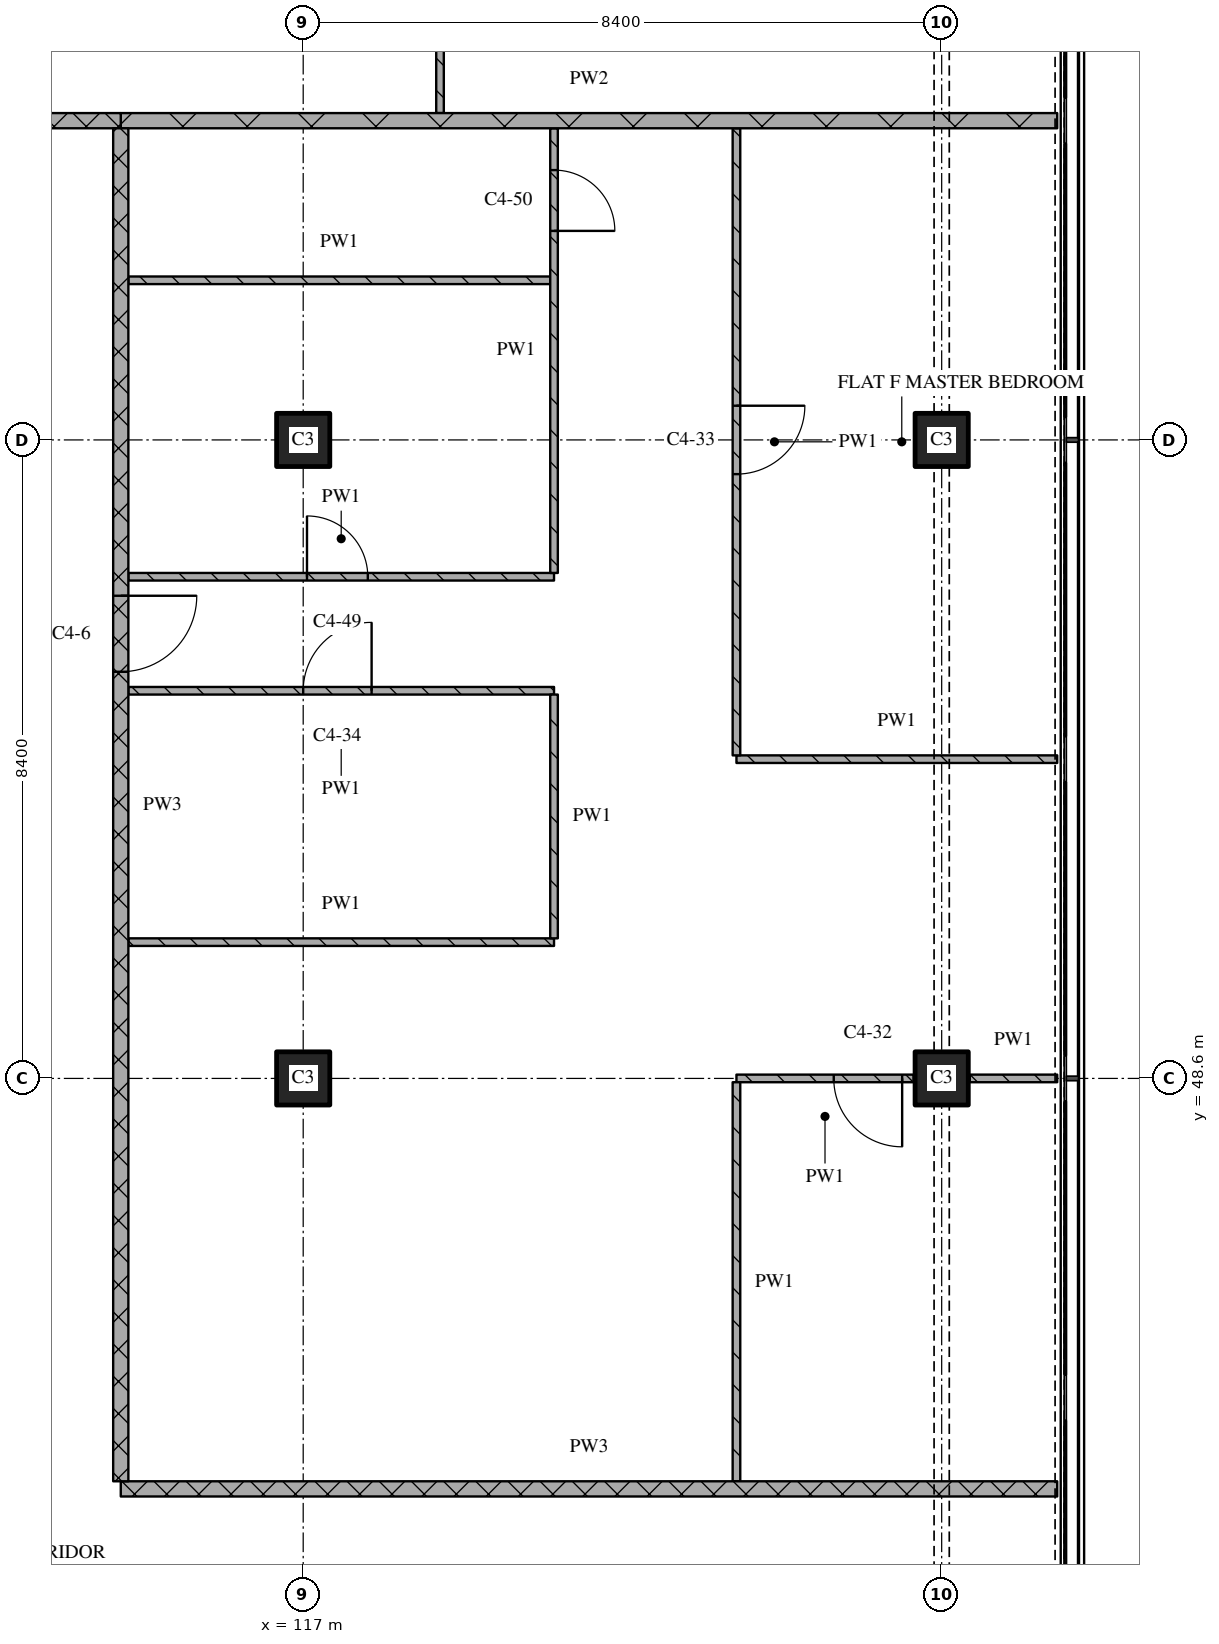
"""IFC4 building model, lengths in metres.
Left out: names, types, materials, properties, quantities, classifications, styles, units other than length and angle.
Written with IfcOpenShell. Run it as: python <this file> out.ifc"""

import sys

from ifc_helpers import new_model, si_unit, direction, frame, frame_2d, origin, origin_2d, place, context, subcontext, project, spatial, rectangle, extrude, element, fill, save


model = new_model("IFC4")
c1 = context("Model", 3, precision=1e-05, world=origin(), true_north=direction((0.0, 1.0)))
c2 = subcontext(c1, "Body", "Model", "MODEL_VIEW")
j1 = project(units=[si_unit("LENGTHUNIT", "METRE"), si_unit("PLANEANGLEUNIT", "RADIAN")], contexts=[c1])
p1 = place(None, origin())
s1 = spatial("IfcSite", under=j1, at=p1, CompositionType="ELEMENT")
p2 = place(p1, origin())
s2 = spatial("IfcBuilding", under=s1, at=p2, CompositionType="ELEMENT")
p3 = place(p2, frame((0.0, 0.0, 187.05)))
s3 = spatial("IfcBuildingStorey", under=s2, at=p3, CompositionType="ELEMENT", Elevation=187.05)
for number, where, z_axis, x_axis in (
    (1, (117.0, 48.6, 0.0), (0.0, 0.0, 1.0), (1.0, 0.0, 0.0)),
    (2, (117.0, 57.0, 0.0), (0.0, 0.0, 1.0), (1.0, 0.0, 0.0)),
    (3, (125.4, 48.6, 0.0), (0.0, 0.0, 1.0), (1.0, 0.0, 0.0)),
    (4, (125.4, 57.0, 0.0), (0.0, 0.0, 1.0), (1.0, 0.0, 0.0)),
):
    element("IfcColumn", number, at=place(p3, frame(where, z_axis=z_axis, x_axis=x_axis)), inside=s3, PredefinedType="COLUMN", context=c2, shape_type="SweptSolid", body=[
        extrude(rectangle(XDim=0.7, YDim=0.7, at=origin_2d()), origin(), (0.0, 0.0, 1.0), 3.6),
    ])
p4 = place(p3, frame((114.6, 43.2, 0.0), z_axis=(0.0, 0.0, 1.0), x_axis=(1.0, 0.0, 0.0)))
e5 = element("IfcWall", 5, at=p4, inside=s3, PredefinedType="PARTITIONING", context=c2, shape_type="SweptSolid", body=[
    extrude(rectangle(XDim=12.32, YDim=0.2, at=frame_2d((6.16, 0.0))), origin(), (0.0, 0.0, 1.0), 3.32),
])
p5 = place(p3, frame((125.03, 48.6, 0.0), z_axis=(0.0, 0.0, 1.0), x_axis=(-1.0, 0.0, 0.0)))
e6 = element("IfcWall", 6, at=p5, inside=s3, PredefinedType="PARTITIONING", context=c2, shape_type="SweptSolid", body=[
    extrude(rectangle(XDim=2.33, YDim=0.1, at=frame_2d((1.165, 0.0))), origin(), (0.0, 0.0, 1.0), 3.32),
])
p6 = place(p5, frame((0.15, 0.0, 0.0)))
e7 = element("IfcOpeningElement", 7, at=p6, cuts=e6, PredefinedType="OPENING", context=c2, shape_type="SweptSolid", body=[
    extrude(rectangle(XDim=0.9, YDim=2.1, at=frame_2d((0.45, 1.05))), frame((0.0, 0.06, 0.0), z_axis=(0.0, -1.0, 0.0), x_axis=(1.0, 0.0, 0.0)), (0.0, 0.0, 1.0), 0.12),
])
p7 = place(p3, frame((125.77, 48.6, 0.0), z_axis=(0.0, 0.0, 1.0), x_axis=(1.0, 0.0, 0.0)))
e8 = element("IfcWall", 8, at=p7, inside=s3, PredefinedType="PARTITIONING", context=c2, shape_type="SweptSolid", body=[
    extrude(rectangle(XDim=1.15, YDim=0.1, at=frame_2d((0.575, 0.0))), origin(), (0.0, 0.0, 1.0), 3.32),
])
p8 = place(p3, frame((114.7, 50.393, 0.0), z_axis=(0.0, 0.0, 1.0), x_axis=(1.0, 0.0, 0.0)))
e9 = element("IfcWall", 9, at=p8, inside=s3, PredefinedType="PARTITIONING", context=c2, shape_type="SweptSolid", body=[
    extrude(rectangle(XDim=5.6, YDim=0.1, at=frame_2d((2.8, 0.0))), origin(), (0.0, 0.0, 1.0), 3.32),
])
p9 = place(p3, frame((122.7, 52.8, 0.0), z_axis=(0.0, 0.0, 1.0), x_axis=(1.0, 0.0, 0.0)))
e10 = element("IfcWall", 10, at=p9, inside=s3, PredefinedType="PARTITIONING", context=c2, shape_type="SweptSolid", body=[
    extrude(rectangle(XDim=4.22, YDim=0.1, at=frame_2d((2.11, 0.0))), origin(), (0.0, 0.0, 1.0), 3.32),
])
p10 = place(p3, frame((120.3, 53.7, 0.0), z_axis=(0.0, 0.0, 1.0), x_axis=(-1.0, 0.0, 0.0)))
e11 = element("IfcWall", 11, at=p10, inside=s3, PredefinedType="PARTITIONING", context=c2, shape_type="SweptSolid", body=[
    extrude(rectangle(XDim=5.6, YDim=0.1, at=frame_2d((2.8, 0.0))), origin(), (0.0, 0.0, 1.0), 3.32),
])
p11 = place(p10, frame((2.4, 0.0, 0.0)))
e12 = element("IfcOpeningElement", 12, at=p11, cuts=e11, PredefinedType="OPENING", context=c2, shape_type="SweptSolid", body=[
    extrude(rectangle(XDim=0.9, YDim=2.1, at=frame_2d((0.45, 1.05))), frame((0.0, 0.06, 0.0), z_axis=(0.0, -1.0, 0.0), x_axis=(1.0, 0.0, 0.0)), (0.0, 0.0, 1.0), 0.12),
])
p12 = place(p3, frame((114.7, 55.2, 0.0), z_axis=(0.0, 0.0, 1.0), x_axis=(1.0, 0.0, 0.0)))
e13 = element("IfcWall", 13, at=p12, inside=s3, PredefinedType="PARTITIONING", context=c2, shape_type="SweptSolid", body=[
    extrude(rectangle(XDim=5.6, YDim=0.1, at=frame_2d((2.8, 0.0))), origin(), (0.0, 0.0, 1.0), 3.32),
])
p13 = place(p12, frame((2.35, 0.0, 0.0)))
e14 = element("IfcOpeningElement", 14, at=p13, cuts=e13, PredefinedType="OPENING", context=c2, shape_type="SweptSolid", body=[
    extrude(rectangle(XDim=0.8, YDim=2.1, at=frame_2d((0.4, 1.05))), frame((0.0, 0.06, 0.0), z_axis=(0.0, -1.0, 0.0), x_axis=(1.0, 0.0, 0.0)), (0.0, 0.0, 1.0), 0.12),
])
p14 = place(p3, frame((114.7, 59.1, 0.0), z_axis=(0.0, 0.0, 1.0), x_axis=(1.0, 0.0, 0.0)))
e15 = element("IfcWall", 15, at=p14, inside=s3, PredefinedType="PARTITIONING", context=c2, shape_type="SweptSolid", body=[
    extrude(rectangle(XDim=5.55, YDim=0.1, at=frame_2d((2.775, 0.0))), origin(), (0.0, 0.0, 1.0), 3.32),
])
p15 = place(p3, frame((111.0, 61.2, 0.0), z_axis=(0.0, 0.0, 1.0), x_axis=(1.0, 0.0, 0.0)))
e16 = element("IfcWall", 16, at=p15, inside=s3, PredefinedType="PARTITIONING", context=c2, shape_type="SweptSolid", body=[
    extrude(rectangle(XDim=3.6, YDim=0.2, at=frame_2d((1.8, 0.0))), origin(), (0.0, 0.0, 1.0), 3.32),
])
p16 = place(p3, frame((114.6, 61.2, 0.0), z_axis=(0.0, 0.0, 1.0), x_axis=(1.0, 0.0, 0.0)))
e17 = element("IfcWall", 17, at=p16, inside=s3, PredefinedType="PARTITIONING", context=c2, shape_type="SweptSolid", body=[
    extrude(rectangle(XDim=12.32, YDim=0.2, at=frame_2d((6.16, 0.0))), origin(), (0.0, 0.0, 1.0), 3.32),
])
p17 = place(p3, frame((114.6, 61.1, 0.0), z_axis=(0.0, 0.0, 1.0), x_axis=(0.0, -1.0, 0.0)))
e18 = element("IfcWall", 18, at=p17, inside=s3, PredefinedType="PARTITIONING", context=c2, shape_type="SweptSolid", body=[
    extrude(rectangle(XDim=17.8, YDim=0.2, at=frame_2d((8.9, 0.0))), origin(), (0.0, 0.0, 1.0), 3.32),
])
p18 = place(p17, frame((6.15, 0.0, 0.0)))
e19 = element("IfcOpeningElement", 19, at=p18, cuts=e18, PredefinedType="OPENING", context=c2, shape_type="SweptSolid", body=[
    extrude(rectangle(XDim=1.0, YDim=2.1, at=frame_2d((0.5, 1.05))), frame((0.0, 0.11, 0.0), z_axis=(0.0, -1.0, 0.0), x_axis=(1.0, 0.0, 0.0)), (0.0, 0.0, 1.0), 0.22),
])
p19 = place(p3, frame((118.8, 61.3, 0.0), z_axis=(0.0, 0.0, 1.0), x_axis=(0.0, 1.0, 0.0)))
e20 = element("IfcWall", 20, at=p19, inside=s3, PredefinedType="PARTITIONING", context=c2, shape_type="SweptSolid", body=[
    extrude(rectangle(XDim=3.15, YDim=0.1, at=frame_2d((1.575, 0.0))), origin(), (0.0, 0.0, 1.0), 3.32),
])
p20 = place(p19, frame((1.15, 0.0, 0.0)))
e21 = element("IfcOpeningElement", 21, at=p20, cuts=e20, PredefinedType="OPENING", context=c2, shape_type="SweptSolid", body=[
    extrude(rectangle(XDim=0.8, YDim=2.1, at=frame_2d((0.4, 1.05))), frame((0.0, 0.06, 0.0), z_axis=(0.0, -1.0, 0.0), x_axis=(1.0, 0.0, 0.0)), (0.0, 0.0, 1.0), 0.12),
])
p21 = place(p3, frame((120.3, 53.65, 0.0), z_axis=(0.0, 0.0, 1.0), x_axis=(0.0, -1.0, 0.0)))
e22 = element("IfcWall", 22, at=p21, inside=s3, PredefinedType="PARTITIONING", context=c2, shape_type="SweptSolid", body=[
    extrude(rectangle(XDim=3.207, YDim=0.1, at=frame_2d((1.604, 0.0))), origin(), (0.0, 0.0, 1.0), 3.32),
])
p22 = place(p3, frame((120.3, 55.25, 0.0), z_axis=(0.0, 0.0, 1.0), x_axis=(0.0, 1.0, 0.0)))
e23 = element("IfcWall", 23, at=p22, inside=s3, PredefinedType="PARTITIONING", context=c2, shape_type="SweptSolid", body=[
    extrude(rectangle(XDim=5.85, YDim=0.1, at=frame_2d((2.925, 0.0))), origin(), (0.0, 0.0, 1.0), 3.32),
])
p23 = place(p22, frame((4.5, 0.0, 0.0)))
e24 = element("IfcOpeningElement", 24, at=p23, cuts=e23, PredefinedType="OPENING", context=c2, shape_type="SweptSolid", body=[
    extrude(rectangle(XDim=0.8, YDim=2.1, at=frame_2d((0.4, 1.05))), frame((0.0, 0.06, 0.0), z_axis=(0.0, -1.0, 0.0), x_axis=(1.0, 0.0, 0.0)), (0.0, 0.0, 1.0), 0.12),
])
p24 = place(p3, frame((122.7, 48.55, 0.0), z_axis=(0.0, 0.0, 1.0), x_axis=(0.0, -1.0, 0.0)))
e25 = element("IfcWall", 25, at=p24, inside=s3, PredefinedType="PARTITIONING", context=c2, shape_type="SweptSolid", body=[
    extrude(rectangle(XDim=5.25, YDim=0.1, at=frame_2d((2.625, 0.0))), origin(), (0.0, 0.0, 1.0), 3.32),
])
p25 = place(p3, frame((122.7, 61.1, 0.0), z_axis=(0.0, 0.0, 1.0), x_axis=(0.0, -1.0, 0.0)))
e26 = element("IfcWall", 26, at=p25, inside=s3, PredefinedType="PARTITIONING", context=c2, shape_type="SweptSolid", body=[
    extrude(rectangle(XDim=8.25, YDim=0.1, at=frame_2d((4.125, 0.0))), origin(), (0.0, 0.0, 1.0), 3.32),
])
p26 = place(p25, frame((3.65, 0.0, 0.0)))
e27 = element("IfcOpeningElement", 27, at=p26, cuts=e26, PredefinedType="OPENING", context=c2, shape_type="SweptSolid", body=[
    extrude(rectangle(XDim=0.9, YDim=2.1, at=frame_2d((0.45, 1.05))), frame((0.0, 0.06, 0.0), z_axis=(0.0, -1.0, 0.0), x_axis=(1.0, 0.0, 0.0)), (0.0, 0.0, 1.0), 0.12),
])
p27 = place(p6, origin())
e28 = element("IfcDoor", 28, at=p27, inside=s3, OperationType="SINGLE_SWING_LEFT", PredefinedType="DOOR", context=c2, shape_type="SweptSolid", body=[
    extrude(rectangle(XDim=0.9, YDim=2.1, at=frame_2d((0.45, 1.05))), frame((0.0, 0.025, 0.0), z_axis=(0.0, -1.0, 0.0), x_axis=(1.0, 0.0, 0.0)), (0.0, 0.0, 1.0), 0.05),
])
fill(e7, e28)
p28 = place(p11, origin())
e29 = element("IfcDoor", 29, at=p28, inside=s3, OperationType="SINGLE_SWING_RIGHT", PredefinedType="DOOR", context=c2, shape_type="SweptSolid", body=[
    extrude(rectangle(XDim=0.9, YDim=2.1, at=frame_2d((0.45, 1.05))), frame((0.0, 0.025, 0.0), z_axis=(0.0, -1.0, 0.0), x_axis=(1.0, 0.0, 0.0)), (0.0, 0.0, 1.0), 0.05),
])
fill(e12, e29)
p29 = place(p13, origin())
e30 = element("IfcDoor", 30, at=p29, inside=s3, OperationType="SINGLE_SWING_LEFT", PredefinedType="DOOR", context=c2, shape_type="SweptSolid", body=[
    extrude(rectangle(XDim=0.8, YDim=2.1, at=frame_2d((0.4, 1.05))), frame((0.0, 0.025, 0.0), z_axis=(0.0, -1.0, 0.0), x_axis=(1.0, 0.0, 0.0)), (0.0, 0.0, 1.0), 0.05),
])
fill(e14, e30)
p30 = place(p18, origin())
e31 = element("IfcDoor", 31, at=p30, inside=s3, OperationType="SINGLE_SWING_LEFT", PredefinedType="DOOR", context=c2, shape_type="SweptSolid", body=[
    extrude(rectangle(XDim=1.0, YDim=2.1, at=frame_2d((0.5, 1.05))), frame((0.0, 0.025, 0.0), z_axis=(0.0, -1.0, 0.0), x_axis=(1.0, 0.0, 0.0)), (0.0, 0.0, 1.0), 0.05),
])
fill(e19, e31)
p31 = place(p23, origin())
e32 = element("IfcDoor", 32, at=p31, inside=s3, OperationType="SINGLE_SWING_RIGHT", PredefinedType="DOOR", context=c2, shape_type="SweptSolid", body=[
    extrude(rectangle(XDim=0.8, YDim=2.1, at=frame_2d((0.4, 1.05))), frame((0.0, 0.025, 0.0), z_axis=(0.0, -1.0, 0.0), x_axis=(1.0, 0.0, 0.0)), (0.0, 0.0, 1.0), 0.05),
])
fill(e24, e32)
p32 = place(p26, origin())
e33 = element("IfcDoor", 33, at=p32, inside=s3, OperationType="SINGLE_SWING_LEFT", PredefinedType="DOOR", context=c2, shape_type="SweptSolid", body=[
    extrude(rectangle(XDim=0.9, YDim=2.1, at=frame_2d((0.45, 1.05))), frame((0.0, 0.025, 0.0), z_axis=(0.0, -1.0, 0.0), x_axis=(1.0, 0.0, 0.0)), (0.0, 0.0, 1.0), 0.05),
])
fill(e27, e33)
save(model, sys.argv[1])
